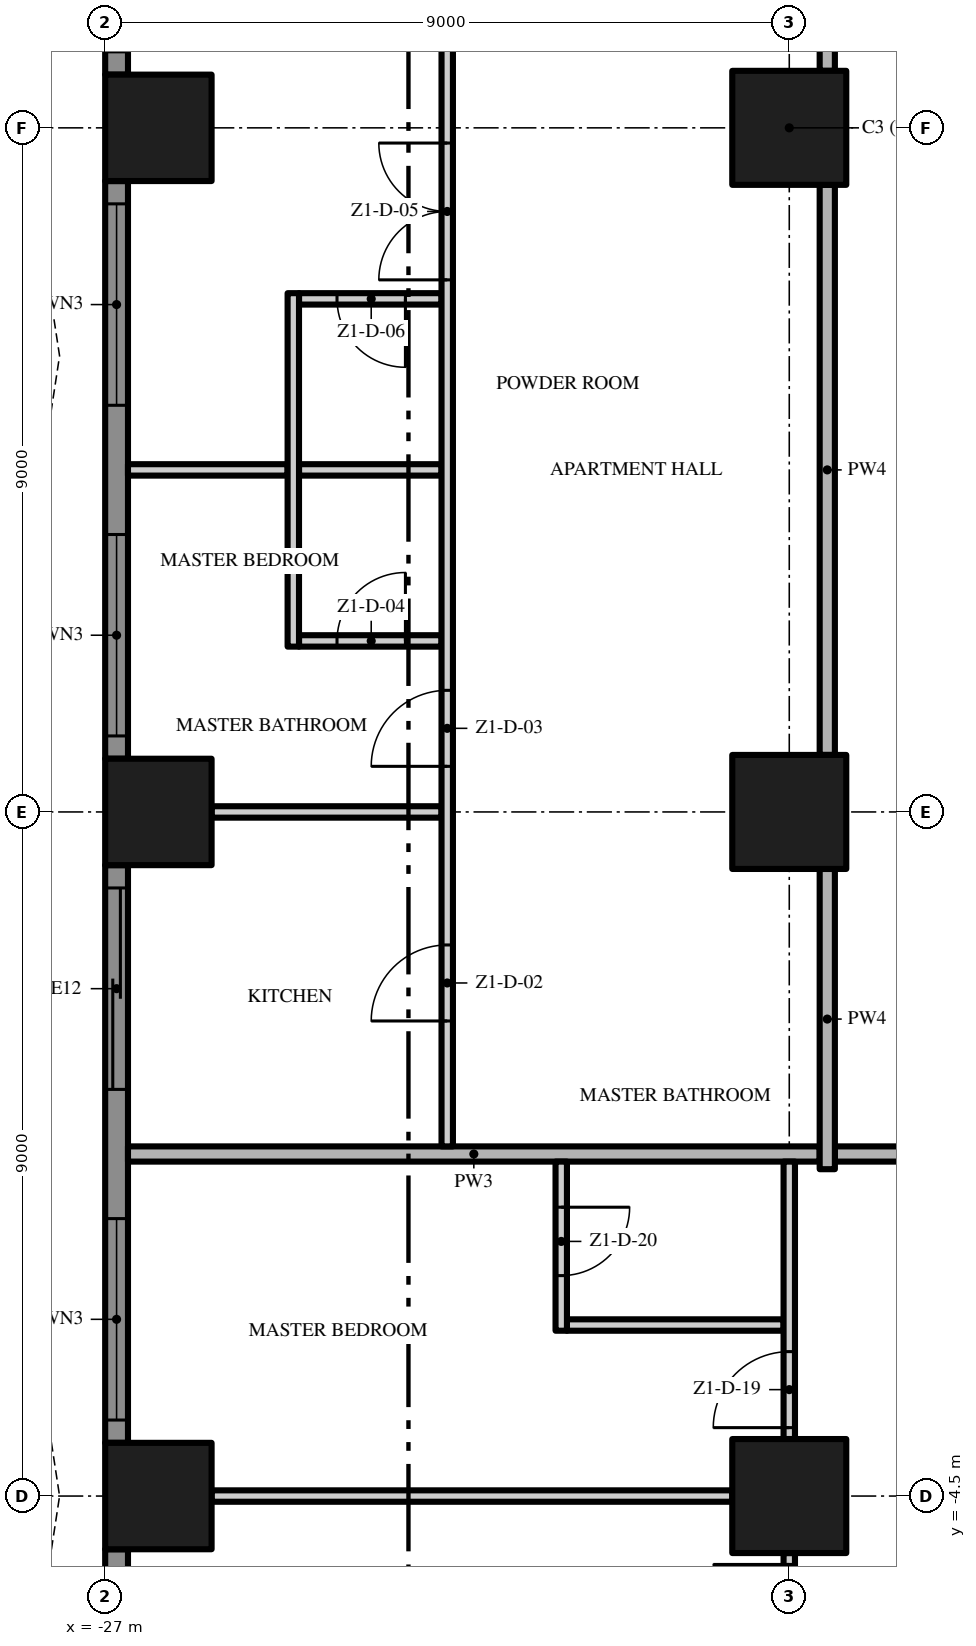
"""IFC4 building model, lengths in metres.
Left out: names, types, materials, properties, quantities, classifications, styles, units other than length and angle.
Written with IfcOpenShell. Run it as: python <this file> out.ifc"""

import sys

from ifc_helpers import new_model, si_unit, direction, frame, frame_2d, origin, origin_2d, place, context, subcontext, project, spatial, polyline, rectangle, outline, extrude, element, fill, save


model = new_model("IFC4")
c1 = context("Model", 3, precision=1e-05, world=origin(), true_north=direction((0.0, 1.0)))
c2 = subcontext(c1, "Body", "Model", "MODEL_VIEW")
j1 = project(units=[si_unit("LENGTHUNIT", "METRE"), si_unit("PLANEANGLEUNIT", "RADIAN")], contexts=[c1])
p1 = place(None, origin())
s1 = spatial("IfcSite", under=j1, at=p1, CompositionType="ELEMENT")
p2 = place(p1, origin())
s2 = spatial("IfcBuilding", under=s1, at=p2, CompositionType="ELEMENT")
p3 = place(p2, frame((0.0, 0.0, 53.0)))
s3 = spatial("IfcBuildingStorey", under=s2, at=p3, CompositionType="ELEMENT", Elevation=53.0)
for number, where, z_axis, x_axis in (
    (1, (-18.0, -4.5, 0.0), (0.0, 0.0, 1.0), (1.0, 0.0, 0.0)),
    (2, (-18.0, 13.5, 0.0), (0.0, 0.0, 1.0), (1.0, 0.0, 0.0)),
    (3, (-18.0, 4.5, 0.0), (0.0, 0.0, 1.0), (1.0, 0.0, 0.0)),
):
    element("IfcColumn", number, at=place(p3, frame(where, z_axis=z_axis, x_axis=x_axis)), inside=s3, PredefinedType="COLUMN", context=c2, shape_type="SweptSolid", body=[
        extrude(rectangle(XDim=1.5, YDim=1.5, at=origin_2d()), origin(), (0.0, 0.0, 1.0), 3.5),
    ])
for number, where, z_axis, x_axis in (
    (4, (-26.3, -4.5, 0.0), (0.0, 0.0, 1.0), (1.0, 0.0, 0.0)),
    (5, (-26.3, 13.5, 0.0), (0.0, 0.0, 1.0), (1.0, 0.0, 0.0)),
    (6, (-26.3, 4.5, 0.0), (0.0, 0.0, 1.0), (1.0, 0.0, 0.0)),
):
    element("IfcColumn", number, at=place(p3, frame(where, z_axis=z_axis, x_axis=x_axis)), inside=s3, PredefinedType="COLUMN", context=c2, shape_type="SweptSolid", body=[
        extrude(rectangle(XDim=1.4, YDim=1.4, at=origin_2d()), origin(), (0.0, 0.0, 1.0), 3.5),
    ])
p4 = place(p3, frame((-26.85, 14.2, 0.0), z_axis=(0.0, 0.0, 1.0), x_axis=(0.0, 1.0, 0.0)))
e7 = element("IfcWall", 7, at=p4, inside=s3, PredefinedType="SOLIDWALL", context=c2, shape_type="SweptSolid", body=[
    extrude(rectangle(XDim=3.5, YDim=0.3, at=frame_2d((1.75, 0.0))), origin(), (0.0, 0.0, 1.0), 3.5),
])
p5 = place(p4, frame((0.3, 0.0, 0.0)))
e8 = element("IfcOpeningElement", 8, at=p5, cuts=e7, PredefinedType="OPENING", context=c2, shape_type="SweptSolid", body=[
    extrude(rectangle(XDim=2.65, YDim=2.4, at=frame_2d((1.325, 1.2))), frame((0.0, 0.16, 0.0), z_axis=(0.0, -1.0, 0.0), x_axis=(1.0, 0.0, 0.0)), (0.0, 0.0, 1.0), 0.32),
])
p6 = place(p3, frame((-26.85, 5.2, 0.0), z_axis=(0.0, 0.0, 1.0), x_axis=(0.0, 1.0, 0.0)))
e9 = element("IfcWall", 9, at=p6, inside=s3, PredefinedType="SOLIDWALL", context=c2, shape_type="SweptSolid", body=[
    extrude(rectangle(XDim=7.6, YDim=0.3, at=frame_2d((3.8, 0.0))), origin(), (0.0, 0.0, 1.0), 3.5),
])
p7 = place(p6, frame((4.65, 0.0, 0.45)))
e10 = element("IfcOpeningElement", 10, at=p7, cuts=e9, PredefinedType="OPENING", context=c2, shape_type="SweptSolid", body=[
    extrude(rectangle(XDim=2.65, YDim=2.65, at=frame_2d((1.325, 1.325))), frame((0.0, 0.16, 0.0), z_axis=(0.0, -1.0, 0.0), x_axis=(1.0, 0.0, 0.0)), (0.0, 0.0, 1.0), 0.32),
])
p8 = place(p6, frame((0.3, 0.0, 0.45)))
e11 = element("IfcOpeningElement", 11, at=p8, cuts=e9, PredefinedType="OPENING", context=c2, shape_type="SweptSolid", body=[
    extrude(rectangle(XDim=2.65, YDim=2.65, at=frame_2d((1.325, 1.325))), frame((0.0, 0.16, 0.0), z_axis=(0.0, -1.0, 0.0), x_axis=(1.0, 0.0, 0.0)), (0.0, 0.0, 1.0), 0.32),
])
p9 = place(p3, frame((-26.85, -3.8, 0.0), z_axis=(0.0, 0.0, 1.0), x_axis=(0.0, 1.0, 0.0)))
e12 = element("IfcWall", 12, at=p9, inside=s3, PredefinedType="SOLIDWALL", context=c2, shape_type="SweptSolid", body=[
    extrude(rectangle(XDim=7.6, YDim=0.3, at=frame_2d((3.8, 0.0))), origin(), (0.0, 0.0, 1.0), 3.5),
])
p10 = place(p9, frame((4.65, 0.0, 0.0)))
e13 = element("IfcOpeningElement", 13, at=p10, cuts=e12, PredefinedType="OPENING", context=c2, shape_type="SweptSolid", body=[
    extrude(rectangle(XDim=2.65, YDim=2.4, at=frame_2d((1.325, 1.2))), frame((0.0, 0.16, 0.0), z_axis=(0.0, -1.0, 0.0), x_axis=(1.0, 0.0, 0.0)), (0.0, 0.0, 1.0), 0.32),
])
p11 = place(p9, frame((0.3, 0.0, 0.45)))
e14 = element("IfcOpeningElement", 14, at=p11, cuts=e12, PredefinedType="OPENING", context=c2, shape_type="SweptSolid", body=[
    extrude(rectangle(XDim=2.65, YDim=2.65, at=frame_2d((1.325, 1.325))), frame((0.0, 0.16, 0.0), z_axis=(0.0, -1.0, 0.0), x_axis=(1.0, 0.0, 0.0)), (0.0, 0.0, 1.0), 0.32),
])
p12 = place(p3, frame((-26.85, -12.8, 0.0), z_axis=(0.0, 0.0, 1.0), x_axis=(0.0, 1.0, 0.0)))
e15 = element("IfcWall", 15, at=p12, inside=s3, PredefinedType="SOLIDWALL", context=c2, shape_type="SweptSolid", body=[
    extrude(rectangle(XDim=7.6, YDim=0.3, at=frame_2d((3.8, 0.0))), origin(), (0.0, 0.0, 1.0), 3.5),
])
p13 = place(p12, frame((4.65, 0.0, 0.45)))
e16 = element("IfcOpeningElement", 16, at=p13, cuts=e15, PredefinedType="OPENING", context=c2, shape_type="SweptSolid", body=[
    extrude(rectangle(XDim=2.65, YDim=2.65, at=frame_2d((1.325, 1.325))), frame((0.0, 0.16, 0.0), z_axis=(0.0, -1.0, 0.0), x_axis=(1.0, 0.0, 0.0)), (0.0, 0.0, 1.0), 0.32),
])
p14 = place(p12, frame((0.3, 0.0, 0.0)))
e17 = element("IfcOpeningElement", 17, at=p14, cuts=e15, PredefinedType="OPENING", context=c2, shape_type="SweptSolid", body=[
    extrude(rectangle(XDim=2.65, YDim=2.4, at=frame_2d((1.325, 1.2))), frame((0.0, 0.16, 0.0), z_axis=(0.0, -1.0, 0.0), x_axis=(1.0, 0.0, 0.0)), (0.0, 0.0, 1.0), 0.32),
])
p15 = place(p3, origin())
e18 = element("IfcWall", 18, at=p15, inside=s3, PredefinedType="USERDEFINED", context=c2, shape_type="SweptSolid", body=[
    extrude(outline(polyline([(-30.0, 18.0), (-29.771, 16.5), (-29.171, 15.0), (-28.429, 13.5), (-27.829, 12.0), (-27.6, 10.5), (-27.829, 9.0), (-28.429, 7.5), (-29.171, 6.0), (-29.771, 4.5), (-30.0, 3.0), (-29.771, 1.5), (-29.171, 0.0), (-28.429, -1.5), (-27.829, -3.0), (-27.6, -4.5), (-27.829, -6.0), (-28.429, -7.5), (-29.171, -9.0), (-29.771, -10.5), (-30.0, -12.0), (-29.771, -13.5), (-29.171, -15.0), (-28.429, -16.5), (-27.829, -18.0), (-27.597, -17.907), (-28.201, -16.398), (-28.942, -14.898), (-29.528, -13.434), (-29.747, -12.0), (-29.528, -10.566), (-28.942, -9.102), (-28.201, -7.602), (-27.586, -6.066), (-27.347, -4.5), (-27.586, -2.934), (-28.201, -1.398), (-28.942, 0.102), (-29.528, 1.566), (-29.747, 3.0), (-29.528, 4.434), (-28.942, 5.898), (-28.201, 7.398), (-27.586, 8.934), (-27.347, 10.5), (-27.586, 12.066), (-28.201, 13.602), (-28.942, 15.102), (-29.528, 16.566), (-29.753, 18.038), (-30.0, 18.0)])), origin(), (0.0, 0.0, 1.0), 0.9),
])
p16 = place(p3, frame((-25.6, -4.5, 0.0), z_axis=(0.0, 0.0, 1.0), x_axis=(1.0, 0.0, 0.0)))
e19 = element("IfcWall", 19, at=p16, inside=s3, PredefinedType="PARTITIONING", context=c2, shape_type="SweptSolid", body=[
    extrude(rectangle(XDim=6.85, YDim=0.15, at=frame_2d((3.425, 0.0))), origin(), (0.0, 0.0, 1.0), 3.5),
])
p17 = place(p3, frame((-20.925, -2.25, 0.0), z_axis=(0.0, 0.0, 1.0), x_axis=(1.0, 0.0, 0.0)))
e20 = element("IfcWall", 20, at=p17, inside=s3, PredefinedType="PARTITIONING", context=c2, shape_type="SweptSolid", body=[
    extrude(rectangle(XDim=2.85, YDim=0.15, at=frame_2d((1.425, 0.0))), origin(), (0.0, 0.0, 1.0), 3.5),
])
p18 = place(p3, frame((-17.4, 0.0, 0.0), z_axis=(0.0, 0.0, 1.0), x_axis=(1.0, 0.0, 0.0)))
e21 = element("IfcWall", 21, at=p18, inside=s3, PredefinedType="PARTITIONING", context=c2, shape_type="SweptSolid", body=[
    extrude(rectangle(XDim=12.8, YDim=0.2, at=frame_2d((6.4, 0.0))), origin(), (0.0, 0.0, 1.0), 3.5),
])
p19 = place(p3, frame((-26.7, 0.0, 0.0), z_axis=(0.0, 0.0, 1.0), x_axis=(1.0, 0.0, 0.0)))
e22 = element("IfcWall", 22, at=p19, inside=s3, PredefinedType="PARTITIONING", context=c2, shape_type="SweptSolid", body=[
    extrude(rectangle(XDim=9.1, YDim=0.2, at=frame_2d((4.55, 0.0))), origin(), (0.0, 0.0, 1.0), 3.5),
])
p20 = place(p3, frame((-25.6, 4.5, 0.0), z_axis=(0.0, 0.0, 1.0), x_axis=(1.0, 0.0, 0.0)))
e23 = element("IfcWall", 23, at=p20, inside=s3, PredefinedType="PARTITIONING", context=c2, shape_type="SweptSolid", body=[
    extrude(rectangle(XDim=3.025, YDim=0.15, at=frame_2d((1.512, 0.0))), origin(), (0.0, 0.0, 1.0), 3.5),
])
p21 = place(p3, frame((-24.45, 6.75, 0.0), z_axis=(0.0, 0.0, 1.0), x_axis=(1.0, 0.0, 0.0)))
e24 = element("IfcWall", 24, at=p21, inside=s3, PredefinedType="PARTITIONING", context=c2, shape_type="SweptSolid", body=[
    extrude(rectangle(XDim=1.875, YDim=0.15, at=frame_2d((0.938, 0.0))), origin(), (0.0, 0.0, 1.0), 3.5),
])
p22 = place(p21, frame((0.5, 0.0, 0.0)))
e25 = element("IfcOpeningElement", 25, at=p22, cuts=e24, PredefinedType="OPENING", context=c2, shape_type="SweptSolid", body=[
    extrude(rectangle(XDim=0.9, YDim=2.1, at=frame_2d((0.45, 1.05))), frame((0.0, 0.085, 0.0), z_axis=(0.0, -1.0, 0.0), x_axis=(1.0, 0.0, 0.0)), (0.0, 0.0, 1.0), 0.17),
])
p23 = place(p3, frame((-26.7, 9.0, 0.0), z_axis=(0.0, 0.0, 1.0), x_axis=(1.0, 0.0, 0.0)))
e26 = element("IfcWall", 26, at=p23, inside=s3, PredefinedType="PARTITIONING", context=c2, shape_type="SweptSolid", body=[
    extrude(rectangle(XDim=2.1, YDim=0.15, at=frame_2d((1.05, 0.0))), origin(), (0.0, 0.0, 1.0), 3.5),
])
p24 = place(p3, frame((-24.45, 9.0, 0.0), z_axis=(0.0, 0.0, 1.0), x_axis=(1.0, 0.0, 0.0)))
e27 = element("IfcWall", 27, at=p24, inside=s3, PredefinedType="PARTITIONING", context=c2, shape_type="SweptSolid", body=[
    extrude(rectangle(XDim=1.875, YDim=0.15, at=frame_2d((0.938, 0.0))), origin(), (0.0, 0.0, 1.0), 3.5),
])
p25 = place(p3, frame((-22.575, 11.25, 0.0), z_axis=(0.0, 0.0, 1.0), x_axis=(-1.0, 0.0, 0.0)))
e28 = element("IfcWall", 28, at=p25, inside=s3, PredefinedType="PARTITIONING", context=c2, shape_type="SweptSolid", body=[
    extrude(rectangle(XDim=1.875, YDim=0.15, at=frame_2d((0.938, 0.0))), origin(), (0.0, 0.0, 1.0), 3.5),
])
p26 = place(p25, frame((0.475, 0.0, 0.0)))
e29 = element("IfcOpeningElement", 29, at=p26, cuts=e28, PredefinedType="OPENING", context=c2, shape_type="SweptSolid", body=[
    extrude(rectangle(XDim=0.9, YDim=2.1, at=frame_2d((0.45, 1.05))), frame((0.0, 0.085, 0.0), z_axis=(0.0, -1.0, 0.0), x_axis=(1.0, 0.0, 0.0)), (0.0, 0.0, 1.0), 0.17),
])
p27 = place(p3, frame((-24.525, 6.675, 0.0), z_axis=(0.0, 0.0, 1.0), x_axis=(0.0, 1.0, 0.0)))
e30 = element("IfcWall", 30, at=p27, inside=s3, PredefinedType="PARTITIONING", context=c2, shape_type="SweptSolid", body=[
    extrude(rectangle(XDim=4.65, YDim=0.15, at=frame_2d((2.325, 0.0))), origin(), (0.0, 0.0, 1.0), 3.5),
])
p28 = place(p3, frame((-22.5, 0.1, 0.0), z_axis=(0.0, 0.0, 1.0), x_axis=(0.0, 1.0, 0.0)))
e31 = element("IfcWall", 31, at=p28, inside=s3, PredefinedType="PARTITIONING", context=c2, shape_type="SweptSolid", body=[
    extrude(rectangle(XDim=17.2, YDim=0.15, at=frame_2d((8.6, 0.0))), origin(), (0.0, 0.0, 1.0), 3.5),
])
p29 = place(p28, frame((1.65, 0.0, 0.0)))
e32 = element("IfcOpeningElement", 32, at=p29, cuts=e31, PredefinedType="OPENING", context=c2, shape_type="SweptSolid", body=[
    extrude(rectangle(XDim=1.0, YDim=2.4, at=frame_2d((0.5, 1.2))), frame((0.0, 0.085, 0.0), z_axis=(0.0, -1.0, 0.0), x_axis=(1.0, 0.0, 0.0)), (0.0, 0.0, 1.0), 0.17),
])
p30 = place(p28, frame((5.0, 0.0, 0.0)))
e33 = element("IfcOpeningElement", 33, at=p30, cuts=e31, PredefinedType="OPENING", context=c2, shape_type="SweptSolid", body=[
    extrude(rectangle(XDim=1.0, YDim=2.4, at=frame_2d((0.5, 1.2))), frame((0.0, 0.085, 0.0), z_axis=(0.0, -1.0, 0.0), x_axis=(1.0, 0.0, 0.0)), (0.0, 0.0, 1.0), 0.17),
])
p31 = place(p28, frame((11.4, 0.0, 0.0)))
e34 = element("IfcOpeningElement", 34, at=p31, cuts=e31, PredefinedType="OPENING", context=c2, shape_type="SweptSolid", body=[
    extrude(rectangle(XDim=1.8, YDim=2.4, at=frame_2d((0.9, 1.2))), frame((0.0, 0.085, 0.0), z_axis=(0.0, -1.0, 0.0), x_axis=(1.0, 0.0, 0.0)), (0.0, 0.0, 1.0), 0.17),
])
p32 = place(p3, frame((-21.0, -0.1, 0.0), z_axis=(0.0, 0.0, 1.0), x_axis=(0.0, -1.0, 0.0)))
e35 = element("IfcWall", 35, at=p32, inside=s3, PredefinedType="PARTITIONING", context=c2, shape_type="SweptSolid", body=[
    extrude(rectangle(XDim=2.225, YDim=0.15, at=frame_2d((1.113, 0.0))), origin(), (0.0, 0.0, 1.0), 3.5),
])
p33 = place(p32, frame((0.6, 0.0, 0.0)))
e36 = element("IfcOpeningElement", 36, at=p33, cuts=e35, PredefinedType="OPENING", context=c2, shape_type="SweptSolid", body=[
    extrude(rectangle(XDim=0.9, YDim=2.1, at=frame_2d((0.45, 1.05))), frame((0.0, 0.085, 0.0), z_axis=(0.0, -1.0, 0.0), x_axis=(1.0, 0.0, 0.0)), (0.0, 0.0, 1.0), 0.17),
])
p34 = place(p3, frame((-18.0, -12.75, 0.0), z_axis=(0.0, 0.0, 1.0), x_axis=(0.0, 1.0, 0.0)))
e37 = element("IfcWall", 37, at=p34, inside=s3, PredefinedType="PARTITIONING", context=c2, shape_type="SweptSolid", body=[
    extrude(rectangle(XDim=7.5, YDim=0.15, at=frame_2d((3.75, 0.0))), origin(), (0.0, 0.0, 1.0), 3.5),
])
p35 = place(p34, frame((6.35, 0.0, 0.0)))
e38 = element("IfcOpeningElement", 38, at=p35, cuts=e37, PredefinedType="OPENING", context=c2, shape_type="SweptSolid", body=[
    extrude(rectangle(XDim=1.0, YDim=2.4, at=frame_2d((0.5, 1.2))), frame((0.0, 0.085, 0.0), z_axis=(0.0, -1.0, 0.0), x_axis=(1.0, 0.0, 0.0)), (0.0, 0.0, 1.0), 0.17),
])
p36 = place(p34, frame((0.15, 0.0, 0.0)))
e39 = element("IfcOpeningElement", 39, at=p36, cuts=e37, PredefinedType="OPENING", context=c2, shape_type="SweptSolid", body=[
    extrude(rectangle(XDim=1.0, YDim=2.4, at=frame_2d((0.5, 1.2))), frame((0.0, 0.085, 0.0), z_axis=(0.0, -1.0, 0.0), x_axis=(1.0, 0.0, 0.0)), (0.0, 0.0, 1.0), 0.17),
])
p37 = place(p3, frame((-18.0, -3.75, 0.0), z_axis=(0.0, 0.0, 1.0), x_axis=(0.0, 1.0, 0.0)))
e40 = element("IfcWall", 40, at=p37, inside=s3, PredefinedType="PARTITIONING", context=c2, shape_type="SweptSolid", body=[
    extrude(rectangle(XDim=3.65, YDim=0.15, at=frame_2d((1.825, 0.0))), origin(), (0.0, 0.0, 1.0), 3.5),
])
p38 = place(p37, frame((0.15, 0.0, 0.0)))
e41 = element("IfcOpeningElement", 41, at=p38, cuts=e40, PredefinedType="OPENING", context=c2, shape_type="SweptSolid", body=[
    extrude(rectangle(XDim=1.0, YDim=2.4, at=frame_2d((0.5, 1.2))), frame((0.0, 0.085, 0.0), z_axis=(0.0, -1.0, 0.0), x_axis=(1.0, 0.0, 0.0)), (0.0, 0.0, 1.0), 0.17),
])
p39 = place(p3, frame((-17.5, -0.2, 0.0), z_axis=(0.0, 0.0, 1.0), x_axis=(0.0, 1.0, 0.0)))
e42 = element("IfcWall", 42, at=p39, inside=s3, PredefinedType="PARTITIONING", context=c2, shape_type="SweptSolid", body=[
    extrude(rectangle(XDim=3.95, YDim=0.2, at=frame_2d((1.975, 0.0))), origin(), (0.0, 0.0, 1.0), 3.5),
])
p40 = place(p3, frame((-17.5, 5.25, 0.0), z_axis=(0.0, 0.0, 1.0), x_axis=(0.0, 1.0, 0.0)))
e43 = element("IfcWall", 43, at=p40, inside=s3, PredefinedType="PARTITIONING", context=c2, shape_type="SweptSolid", body=[
    extrude(rectangle(XDim=7.5, YDim=0.2, at=frame_2d((3.75, 0.0))), origin(), (0.0, 0.0, 1.0), 3.5),
])
p41 = place(p3, frame((-17.5, 14.25, 0.0), z_axis=(0.0, 0.0, 1.0), x_axis=(0.0, 1.0, 0.0)))
e44 = element("IfcWall", 44, at=p41, inside=s3, PredefinedType="PARTITIONING", context=c2, shape_type="SweptSolid", body=[
    extrude(rectangle(XDim=6.85, YDim=0.2, at=frame_2d((3.425, 0.0))), origin(), (0.0, 0.0, 1.0), 3.5),
])
p42 = place(p41, frame((0.9, 0.0, 0.0)))
e45 = element("IfcOpeningElement", 45, at=p42, cuts=e44, PredefinedType="OPENING", context=c2, shape_type="SweptSolid", body=[
    extrude(rectangle(XDim=1.2, YDim=2.4, at=frame_2d((0.6, 1.2))), frame((0.0, 0.11, 0.0), z_axis=(0.0, -1.0, 0.0), x_axis=(1.0, 0.0, 0.0)), (0.0, 0.0, 1.0), 0.22),
])
p43 = place(p7, origin())
e46 = element("IfcWindow", 46, at=p43, inside=s3, PartitioningType="SINGLE_PANEL", PredefinedType="WINDOW", context=c2, shape_type="SweptSolid", body=[
    extrude(rectangle(XDim=2.65, YDim=2.65, at=frame_2d((1.325, 1.325))), frame((0.0, 0.03, 0.0), z_axis=(0.0, -1.0, 0.0), x_axis=(1.0, 0.0, 0.0)), (0.0, 0.0, 1.0), 0.06),
])
fill(e10, e46)
p44 = place(p8, origin())
e47 = element("IfcWindow", 47, at=p44, inside=s3, PartitioningType="SINGLE_PANEL", PredefinedType="WINDOW", context=c2, shape_type="SweptSolid", body=[
    extrude(rectangle(XDim=2.65, YDim=2.65, at=frame_2d((1.325, 1.325))), frame((0.0, 0.03, 0.0), z_axis=(0.0, -1.0, 0.0), x_axis=(1.0, 0.0, 0.0)), (0.0, 0.0, 1.0), 0.06),
])
fill(e11, e47)
p45 = place(p10, origin())
e48 = element("IfcDoor", 48, at=p45, inside=s3, OperationType="SINGLE_SWING_LEFT", PredefinedType="DOOR", context=c2, shape_type="SweptSolid", body=[
    extrude(rectangle(XDim=2.65, YDim=2.4, at=frame_2d((1.325, 1.2))), frame((0.0, 0.025, 0.0), z_axis=(0.0, -1.0, 0.0), x_axis=(1.0, 0.0, 0.0)), (0.0, 0.0, 1.0), 0.05),
])
fill(e13, e48)
p46 = place(p11, origin())
e49 = element("IfcWindow", 49, at=p46, inside=s3, PartitioningType="SINGLE_PANEL", PredefinedType="WINDOW", context=c2, shape_type="SweptSolid", body=[
    extrude(rectangle(XDim=2.65, YDim=2.65, at=frame_2d((1.325, 1.325))), frame((0.0, 0.03, 0.0), z_axis=(0.0, -1.0, 0.0), x_axis=(1.0, 0.0, 0.0)), (0.0, 0.0, 1.0), 0.06),
])
fill(e14, e49)
p47 = place(p29, origin())
e50 = element("IfcDoor", 50, at=p47, inside=s3, OperationType="SINGLE_SWING_LEFT", PredefinedType="DOOR", context=c2, shape_type="SweptSolid", body=[
    extrude(rectangle(XDim=1.0, YDim=2.4, at=frame_2d((0.5, 1.2))), frame((0.0, 0.025, 0.0), z_axis=(0.0, -1.0, 0.0), x_axis=(1.0, 0.0, 0.0)), (0.0, 0.0, 1.0), 0.05),
])
fill(e32, e50)
p48 = place(p30, origin())
e51 = element("IfcDoor", 51, at=p48, inside=s3, OperationType="SINGLE_SWING_LEFT", PredefinedType="DOOR", context=c2, shape_type="SweptSolid", body=[
    extrude(rectangle(XDim=1.0, YDim=2.4, at=frame_2d((0.5, 1.2))), frame((0.0, 0.025, 0.0), z_axis=(0.0, -1.0, 0.0), x_axis=(1.0, 0.0, 0.0)), (0.0, 0.0, 1.0), 0.05),
])
fill(e33, e51)
p49 = place(p22, origin())
e52 = element("IfcDoor", 52, at=p49, inside=s3, OperationType="SINGLE_SWING_RIGHT", PredefinedType="DOOR", context=c2, shape_type="SweptSolid", body=[
    extrude(rectangle(XDim=0.9, YDim=2.1, at=frame_2d((0.45, 1.05))), frame((0.0, 0.025, 0.0), z_axis=(0.0, -1.0, 0.0), x_axis=(1.0, 0.0, 0.0)), (0.0, 0.0, 1.0), 0.05),
])
fill(e25, e52)
p50 = place(p31, origin())
e53 = element("IfcDoor", 53, at=p50, inside=s3, OperationType="DOUBLE_DOOR_SINGLE_SWING", PredefinedType="DOOR", context=c2, shape_type="SweptSolid", body=[
    extrude(rectangle(XDim=1.8, YDim=2.4, at=frame_2d((0.9, 1.2))), frame((0.0, 0.025, 0.0), z_axis=(0.0, -1.0, 0.0), x_axis=(1.0, 0.0, 0.0)), (0.0, 0.0, 1.0), 0.05),
])
fill(e34, e53)
p51 = place(p26, origin())
e54 = element("IfcDoor", 54, at=p51, inside=s3, OperationType="SINGLE_SWING_LEFT", PredefinedType="DOOR", context=c2, shape_type="SweptSolid", body=[
    extrude(rectangle(XDim=0.9, YDim=2.1, at=frame_2d((0.45, 1.05))), frame((0.0, 0.025, 0.0), z_axis=(0.0, -1.0, 0.0), x_axis=(1.0, 0.0, 0.0)), (0.0, 0.0, 1.0), 0.05),
])
fill(e29, e54)
p52 = place(p38, origin())
e55 = element("IfcDoor", 55, at=p52, inside=s3, OperationType="SINGLE_SWING_LEFT", PredefinedType="DOOR", context=c2, shape_type="SweptSolid", body=[
    extrude(rectangle(XDim=1.0, YDim=2.4, at=frame_2d((0.5, 1.2))), frame((0.0, 0.025, 0.0), z_axis=(0.0, -1.0, 0.0), x_axis=(1.0, 0.0, 0.0)), (0.0, 0.0, 1.0), 0.05),
])
fill(e41, e55)
p53 = place(p33, origin())
e56 = element("IfcDoor", 56, at=p53, inside=s3, OperationType="SINGLE_SWING_LEFT", PredefinedType="DOOR", context=c2, shape_type="SweptSolid", body=[
    extrude(rectangle(XDim=0.9, YDim=2.1, at=frame_2d((0.45, 1.05))), frame((0.0, 0.025, 0.0), z_axis=(0.0, -1.0, 0.0), x_axis=(1.0, 0.0, 0.0)), (0.0, 0.0, 1.0), 0.05),
])
fill(e36, e56)
p54 = place(p35, origin())
e57 = element("IfcDoor", 57, at=p54, inside=s3, OperationType="SINGLE_SWING_RIGHT", PredefinedType="DOOR", context=c2, shape_type="SweptSolid", body=[
    extrude(rectangle(XDim=1.0, YDim=2.4, at=frame_2d((0.5, 1.2))), frame((0.0, 0.025, 0.0), z_axis=(0.0, -1.0, 0.0), x_axis=(1.0, 0.0, 0.0)), (0.0, 0.0, 1.0), 0.05),
])
fill(e38, e57)
save(model, sys.argv[1])
